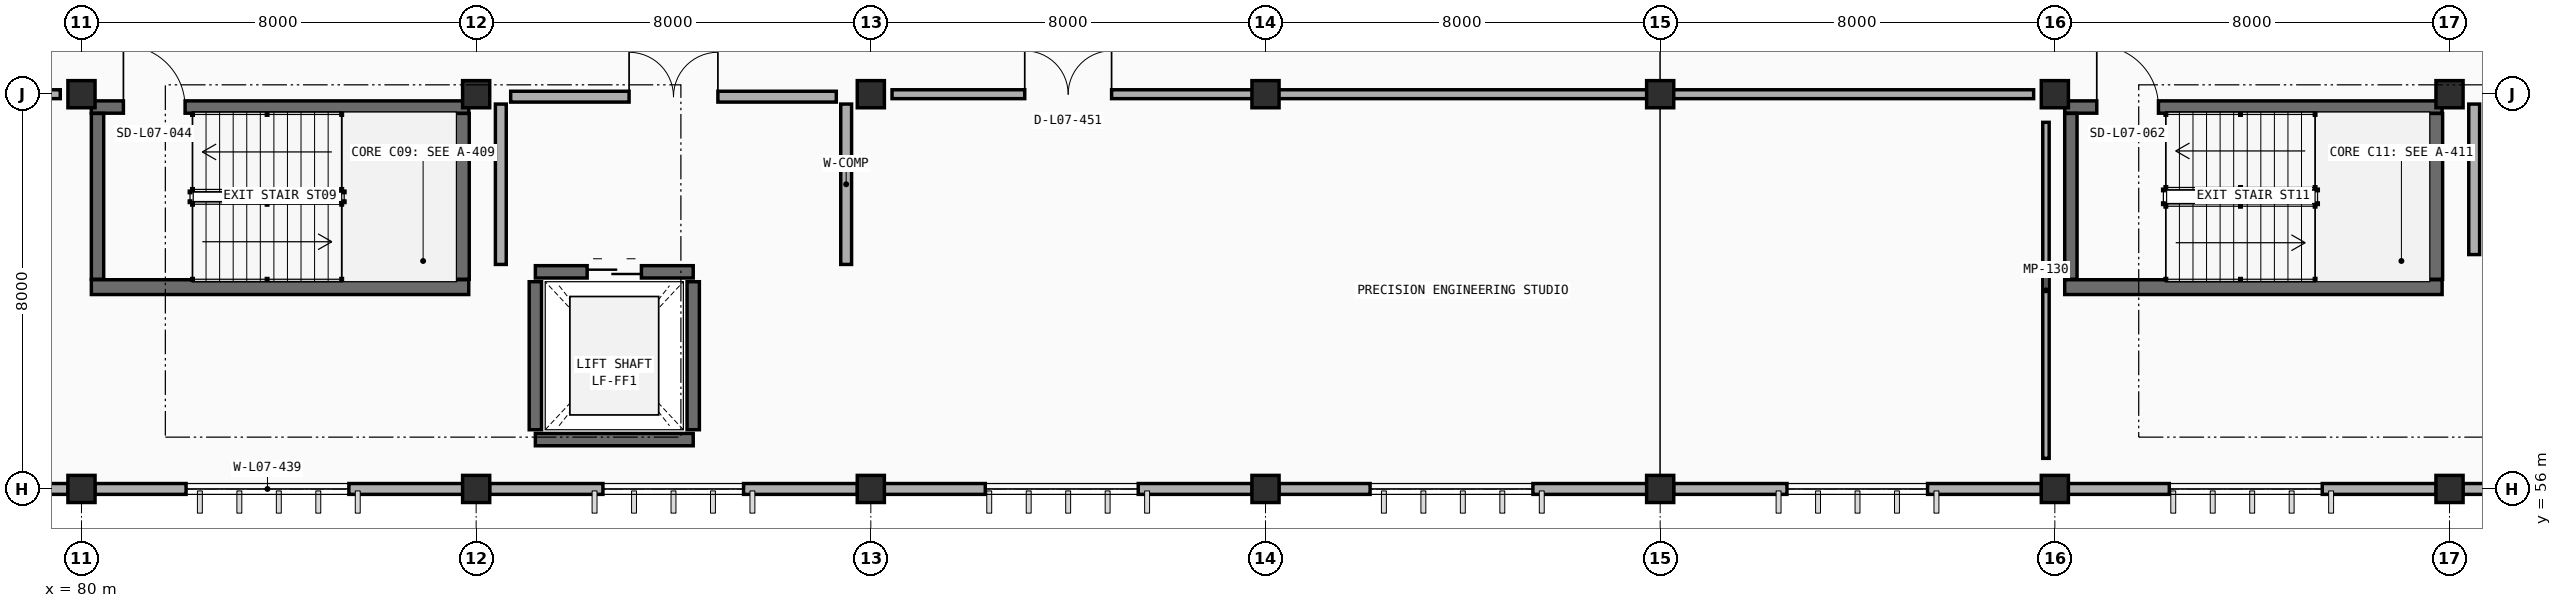
"""IFC4 building model, lengths in metres.
Left out: names, types, materials, properties, quantities, classifications, styles, units other than length and angle.
Written with IfcOpenShell. Run it as: python <this file> out.ifc"""

import sys

from ifc_helpers import new_model, si_unit, direction, frame, frame_2d, origin, origin_2d, place, context, subcontext, project, spatial, rectangle, extrude, element, fill, save


model = new_model("IFC4")
c1 = context("Model", 3, precision=1e-05, world=origin(), true_north=direction((0.0, 1.0)))
c2 = subcontext(c1, "Body", "Model", "MODEL_VIEW")
j1 = project(units=[si_unit("LENGTHUNIT", "METRE"), si_unit("PLANEANGLEUNIT", "RADIAN")], contexts=[c1])
p1 = place(None, origin())
s1 = spatial("IfcSite", under=j1, at=p1, CompositionType="ELEMENT")
p2 = place(p1, origin())
s2 = spatial("IfcBuilding", under=s1, at=p2, CompositionType="ELEMENT")
p3 = place(p2, frame((0.0, 0.0, 26.4)))
s3 = spatial("IfcBuildingStorey", under=s2, at=p3, CompositionType="ELEMENT", Elevation=26.4)
for number, where, z_axis, x_axis in (
    (1, (80.0, 56.0, 0.0), (0.0, 0.0, 1.0), (1.0, 0.0, 0.0)),
    (2, (88.0, 56.0, 0.0), (0.0, 0.0, 1.0), (1.0, 0.0, 0.0)),
    (3, (96.0, 56.0, 0.0), (0.0, 0.0, 1.0), (1.0, 0.0, 0.0)),
    (4, (104.0, 56.0, 0.0), (0.0, 0.0, 1.0), (1.0, 0.0, 0.0)),
    (5, (112.0, 56.0, 0.0), (0.0, 0.0, 1.0), (1.0, 0.0, 0.0)),
    (6, (120.0, 56.0, 0.0), (0.0, 0.0, 1.0), (1.0, 0.0, 0.0)),
    (7, (128.0, 56.0, 0.0), (0.0, 0.0, 1.0), (1.0, 0.0, 0.0)),
    (8, (80.0, 64.0, 0.0), (0.0, 0.0, 1.0), (1.0, 0.0, 0.0)),
    (9, (88.0, 64.0, 0.0), (0.0, 0.0, 1.0), (1.0, 0.0, 0.0)),
    (10, (96.0, 64.0, 0.0), (0.0, 0.0, 1.0), (1.0, 0.0, 0.0)),
    (11, (104.0, 64.0, 0.0), (0.0, 0.0, 1.0), (1.0, 0.0, 0.0)),
    (12, (112.0, 64.0, 0.0), (0.0, 0.0, 1.0), (1.0, 0.0, 0.0)),
    (13, (120.0, 64.0, 0.0), (0.0, 0.0, 1.0), (1.0, 0.0, 0.0)),
    (14, (128.0, 64.0, 0.0), (0.0, 0.0, 1.0), (1.0, 0.0, 0.0)),
):
    element("IfcColumn", number, at=place(p3, frame(where, z_axis=z_axis, x_axis=x_axis)), inside=s3, PredefinedType="COLUMN", context=c2, shape_type="SweptSolid", body=[
        extrude(rectangle(XDim=0.55, YDim=0.55, at=origin_2d()), origin(), (0.0, 0.0, 1.0), 4.2),
    ])
p4 = place(p3, frame((79.728, 56.0, 0.0), z_axis=(0.0, 0.0, 1.0), x_axis=(-1.0, 0.0, 0.0)))
e15 = element("IfcWall", 15, at=p4, inside=s3, PredefinedType="STANDARD", context=c2, shape_type="SweptSolid", body=[
    extrude(rectangle(XDim=7.456, YDim=0.22, at=frame_2d((3.728, 0.0))), origin(), (0.0, 0.0, 1.0), 3.35),
])
p5 = place(p4, frame((2.308, 0.0, 0.9)))
e16 = element("IfcOpeningElement", 16, at=p5, cuts=e15, PredefinedType="OPENING", context=c2, shape_type="SweptSolid", body=[
    extrude(rectangle(XDim=3.1, YDim=1.6, at=frame_2d((1.55, 0.8))), frame((0.0, 0.12, 0.0), z_axis=(0.0, -1.0, 0.0), x_axis=(1.0, 0.0, 0.0)), (0.0, 0.0, 1.0), 0.24),
])
p6 = place(p3, frame((87.728, 56.0, 0.0), z_axis=(0.0, 0.0, 1.0), x_axis=(-1.0, 0.0, 0.0)))
e17 = element("IfcWall", 17, at=p6, inside=s3, PredefinedType="STANDARD", context=c2, shape_type="SweptSolid", body=[
    extrude(rectangle(XDim=7.456, YDim=0.22, at=frame_2d((3.728, 0.0))), origin(), (0.0, 0.0, 1.0), 3.35),
])
p7 = place(p6, frame((2.308, 0.0, 0.9)))
e18 = element("IfcOpeningElement", 18, at=p7, cuts=e17, PredefinedType="OPENING", context=c2, shape_type="SweptSolid", body=[
    extrude(rectangle(XDim=3.3, YDim=1.75, at=frame_2d((1.65, 0.875))), frame((0.0, 0.12, 0.0), z_axis=(0.0, -1.0, 0.0), x_axis=(1.0, 0.0, 0.0)), (0.0, 0.0, 1.0), 0.24),
])
p8 = place(p3, frame((95.728, 56.0, 0.0), z_axis=(0.0, 0.0, 1.0), x_axis=(-1.0, 0.0, 0.0)))
e19 = element("IfcWall", 19, at=p8, inside=s3, PredefinedType="STANDARD", context=c2, shape_type="SweptSolid", body=[
    extrude(rectangle(XDim=7.456, YDim=0.22, at=frame_2d((3.728, 0.0))), origin(), (0.0, 0.0, 1.0), 3.35),
])
p9 = place(p8, frame((2.308, 0.0, 0.9)))
e20 = element("IfcOpeningElement", 20, at=p9, cuts=e19, PredefinedType="OPENING", context=c2, shape_type="SweptSolid", body=[
    extrude(rectangle(XDim=2.85, YDim=2.0, at=frame_2d((1.425, 1.0))), frame((0.0, 0.12, 0.0), z_axis=(0.0, -1.0, 0.0), x_axis=(1.0, 0.0, 0.0)), (0.0, 0.0, 1.0), 0.24),
])
p10 = place(p3, frame((103.728, 56.0, 0.0), z_axis=(0.0, 0.0, 1.0), x_axis=(-1.0, 0.0, 0.0)))
e21 = element("IfcWall", 21, at=p10, inside=s3, PredefinedType="STANDARD", context=c2, shape_type="SweptSolid", body=[
    extrude(rectangle(XDim=7.456, YDim=0.22, at=frame_2d((3.728, 0.0))), origin(), (0.0, 0.0, 1.0), 3.35),
])
p11 = place(p10, frame((2.308, 0.0, 0.9)))
e22 = element("IfcOpeningElement", 22, at=p11, cuts=e21, PredefinedType="OPENING", context=c2, shape_type="SweptSolid", body=[
    extrude(rectangle(XDim=3.1, YDim=1.6, at=frame_2d((1.55, 0.8))), frame((0.0, 0.12, 0.0), z_axis=(0.0, -1.0, 0.0), x_axis=(1.0, 0.0, 0.0)), (0.0, 0.0, 1.0), 0.24),
])
p12 = place(p3, frame((111.728, 56.0, 0.0), z_axis=(0.0, 0.0, 1.0), x_axis=(-1.0, 0.0, 0.0)))
e23 = element("IfcWall", 23, at=p12, inside=s3, PredefinedType="STANDARD", context=c2, shape_type="SweptSolid", body=[
    extrude(rectangle(XDim=7.456, YDim=0.22, at=frame_2d((3.728, 0.0))), origin(), (0.0, 0.0, 1.0), 3.35),
])
p13 = place(p12, frame((2.308, 0.0, 0.9)))
e24 = element("IfcOpeningElement", 24, at=p13, cuts=e23, PredefinedType="OPENING", context=c2, shape_type="SweptSolid", body=[
    extrude(rectangle(XDim=3.3, YDim=1.75, at=frame_2d((1.65, 0.875))), frame((0.0, 0.12, 0.0), z_axis=(0.0, -1.0, 0.0), x_axis=(1.0, 0.0, 0.0)), (0.0, 0.0, 1.0), 0.24),
])
p14 = place(p3, frame((119.728, 56.0, 0.0), z_axis=(0.0, 0.0, 1.0), x_axis=(-1.0, 0.0, 0.0)))
e25 = element("IfcWall", 25, at=p14, inside=s3, PredefinedType="STANDARD", context=c2, shape_type="SweptSolid", body=[
    extrude(rectangle(XDim=7.456, YDim=0.22, at=frame_2d((3.728, 0.0))), origin(), (0.0, 0.0, 1.0), 3.35),
])
p15 = place(p14, frame((2.308, 0.0, 0.9)))
e26 = element("IfcOpeningElement", 26, at=p15, cuts=e25, PredefinedType="OPENING", context=c2, shape_type="SweptSolid", body=[
    extrude(rectangle(XDim=2.85, YDim=2.0, at=frame_2d((1.425, 1.0))), frame((0.0, 0.12, 0.0), z_axis=(0.0, -1.0, 0.0), x_axis=(1.0, 0.0, 0.0)), (0.0, 0.0, 1.0), 0.24),
])
p16 = place(p3, frame((127.728, 56.0, 0.0), z_axis=(0.0, 0.0, 1.0), x_axis=(-1.0, 0.0, 0.0)))
e27 = element("IfcWall", 27, at=p16, inside=s3, PredefinedType="STANDARD", context=c2, shape_type="SweptSolid", body=[
    extrude(rectangle(XDim=7.456, YDim=0.22, at=frame_2d((3.728, 0.0))), origin(), (0.0, 0.0, 1.0), 3.35),
])
p17 = place(p16, frame((2.308, 0.0, 0.9)))
e28 = element("IfcOpeningElement", 28, at=p17, cuts=e27, PredefinedType="OPENING", context=c2, shape_type="SweptSolid", body=[
    extrude(rectangle(XDim=3.1, YDim=1.6, at=frame_2d((1.55, 0.8))), frame((0.0, 0.12, 0.0), z_axis=(0.0, -1.0, 0.0), x_axis=(1.0, 0.0, 0.0)), (0.0, 0.0, 1.0), 0.24),
])
p18 = place(p3, frame((135.728, 56.0, 0.0), z_axis=(0.0, 0.0, 1.0), x_axis=(-1.0, 0.0, 0.0)))
e29 = element("IfcWall", 29, at=p18, inside=s3, PredefinedType="STANDARD", context=c2, shape_type="SweptSolid", body=[
    extrude(rectangle(XDim=7.456, YDim=0.22, at=frame_2d((3.728, 0.0))), origin(), (0.0, 0.0, 1.0), 3.35),
])
p19 = place(p18, frame((2.308, 0.0, 0.9)))
e30 = element("IfcOpeningElement", 30, at=p19, cuts=e29, PredefinedType="OPENING", context=c2, shape_type="SweptSolid", body=[
    extrude(rectangle(XDim=3.3, YDim=1.75, at=frame_2d((1.65, 0.875))), frame((0.0, 0.12, 0.0), z_axis=(0.0, -1.0, 0.0), x_axis=(1.0, 0.0, 0.0)), (0.0, 0.0, 1.0), 0.24),
])
p20 = place(p3, frame((79.9, 48.22, 0.0), z_axis=(0.0, 0.0, 1.0), x_axis=(0.0, 1.0, 0.0)))
e31 = element("IfcWall", 31, at=p20, inside=s3, PredefinedType="PARAPET", context=c2, shape_type="SweptSolid", body=[
    extrude(rectangle(XDim=7.56, YDim=0.18, at=frame_2d((3.78, 0.0))), origin(), (0.0, 0.0, 1.0), 1.15),
])
p21 = place(p3, frame((80.2, 60.09, 0.0), z_axis=(0.0, 0.0, 1.0), x_axis=(1.0, 0.0, 0.0)))
e32 = element("IfcWall", 32, at=p21, inside=s3, PredefinedType="SHEAR", context=c2, shape_type="SweptSolid", body=[
    extrude(rectangle(XDim=7.65, YDim=0.3, at=frame_2d((3.825, 0.0))), origin(), (0.0, 0.0, 1.0), 4.2),
])
p22 = place(p3, frame((87.71, 60.25, 0.0), z_axis=(0.0, 0.0, 1.0), x_axis=(0.0, 1.0, 0.0)))
e33 = element("IfcWall", 33, at=p22, inside=s3, PredefinedType="SHEAR", context=c2, shape_type="SweptSolid", body=[
    extrude(rectangle(XDim=3.36, YDim=0.3, at=frame_2d((1.68, 0.0))), origin(), (0.0, 0.0, 1.0), 4.2),
])
p23 = place(p3, frame((80.2, 63.74, 0.0), z_axis=(0.0, 0.0, 1.0), x_axis=(1.0, 0.0, 0.0)))
e34 = element("IfcWall", 34, at=p23, inside=s3, PredefinedType="SOLIDWALL", context=c2, shape_type="SweptSolid", body=[
    extrude(rectangle(XDim=7.65, YDim=0.25, at=frame_2d((3.825, 0.0))), origin(), (0.0, 0.0, 1.0), 4.2),
])
p24 = place(p23, frame((0.65, 0.0, 0.0)))
e35 = element("IfcOpeningElement", 35, at=p24, cuts=e34, PredefinedType="OPENING", context=c2, shape_type="SweptSolid", body=[
    extrude(rectangle(XDim=1.25, YDim=2.15, at=frame_2d((0.625, 1.075))), frame((0.0, 0.135, 0.0), z_axis=(0.0, -1.0, 0.0), x_axis=(1.0, 0.0, 0.0)), (0.0, 0.0, 1.0), 0.27),
])
p25 = place(p3, frame((80.325, 60.25, 0.0), z_axis=(0.0, 0.0, 1.0), x_axis=(0.0, 1.0, 0.0)))
e36 = element("IfcWall", 36, at=p25, inside=s3, PredefinedType="SOLIDWALL", context=c2, shape_type="SweptSolid", body=[
    extrude(rectangle(XDim=3.36, YDim=0.25, at=frame_2d((1.68, 0.0))), origin(), (0.0, 0.0, 1.0), 4.2),
])
p26 = place(p3, frame((120.2, 60.09, 0.0), z_axis=(0.0, 0.0, 1.0), x_axis=(1.0, 0.0, 0.0)))
e37 = element("IfcWall", 37, at=p26, inside=s3, PredefinedType="SHEAR", context=c2, shape_type="SweptSolid", body=[
    extrude(rectangle(XDim=7.65, YDim=0.3, at=frame_2d((3.825, 0.0))), origin(), (0.0, 0.0, 1.0), 4.2),
])
p27 = place(p3, frame((127.71, 60.25, 0.0), z_axis=(0.0, 0.0, 1.0), x_axis=(0.0, 1.0, 0.0)))
e38 = element("IfcWall", 38, at=p27, inside=s3, PredefinedType="SHEAR", context=c2, shape_type="SweptSolid", body=[
    extrude(rectangle(XDim=3.36, YDim=0.3, at=frame_2d((1.68, 0.0))), origin(), (0.0, 0.0, 1.0), 4.2),
])
p28 = place(p3, frame((120.2, 63.74, 0.0), z_axis=(0.0, 0.0, 1.0), x_axis=(1.0, 0.0, 0.0)))
e39 = element("IfcWall", 39, at=p28, inside=s3, PredefinedType="SOLIDWALL", context=c2, shape_type="SweptSolid", body=[
    extrude(rectangle(XDim=7.65, YDim=0.25, at=frame_2d((3.825, 0.0))), origin(), (0.0, 0.0, 1.0), 4.2),
])
p29 = place(p28, frame((0.65, 0.0, 0.0)))
e40 = element("IfcOpeningElement", 40, at=p29, cuts=e39, PredefinedType="OPENING", context=c2, shape_type="SweptSolid", body=[
    extrude(rectangle(XDim=1.25, YDim=2.15, at=frame_2d((0.625, 1.075))), frame((0.0, 0.135, 0.0), z_axis=(0.0, -1.0, 0.0), x_axis=(1.0, 0.0, 0.0)), (0.0, 0.0, 1.0), 0.27),
])
p30 = place(p3, frame((120.325, 60.25, 0.0), z_axis=(0.0, 0.0, 1.0), x_axis=(0.0, 1.0, 0.0)))
e41 = element("IfcWall", 41, at=p30, inside=s3, PredefinedType="SOLIDWALL", context=c2, shape_type="SweptSolid", body=[
    extrude(rectangle(XDim=3.36, YDim=0.25, at=frame_2d((1.68, 0.0))), origin(), (0.0, 0.0, 1.0), 4.2),
])
p31 = place(p3, frame((89.2, 57.0, 0.0), z_axis=(0.0, 0.0, 1.0), x_axis=(1.0, 0.0, 0.0)))
e42 = element("IfcWall", 42, at=p31, inside=s3, PredefinedType="SOLIDWALL", context=c2, shape_type="SweptSolid", body=[
    extrude(rectangle(XDim=3.2, YDim=0.25, at=frame_2d((1.6, 0.0))), origin(), (0.0, 0.0, 1.0), 4.2),
])
p32 = place(p3, frame((89.2, 60.4, 0.0), z_axis=(0.0, 0.0, 1.0), x_axis=(1.0, 0.0, 0.0)))
e43 = element("IfcWall", 43, at=p32, inside=s3, PredefinedType="SOLIDWALL", context=c2, shape_type="SweptSolid", body=[
    extrude(rectangle(XDim=3.2, YDim=0.25, at=frame_2d((1.6, 0.0))), origin(), (0.0, 0.0, 1.0), 4.2),
])
p33 = place(p32, frame((1.05, 0.0, 0.0)))
e44 = element("IfcOpeningElement", 44, at=p33, cuts=e43, PredefinedType="OPENING", context=c2, shape_type="SweptSolid", body=[
    extrude(rectangle(XDim=1.1, YDim=2.15, at=frame_2d((0.55, 1.075))), frame((0.0, 0.135, 0.0), z_axis=(0.0, -1.0, 0.0), x_axis=(1.0, 0.0, 0.0)), (0.0, 0.0, 1.0), 0.27),
])
for number, where, z_axis, x_axis in (
    (45, (89.2, 57.2, 0.0), (0.0, 0.0, 1.0), (0.0, 1.0, 0.0)),
    (46, (92.4, 57.2, 0.0), (0.0, 0.0, 1.0), (0.0, 1.0, 0.0)),
):
    element("IfcWall", number, at=place(p3, frame(where, z_axis=z_axis, x_axis=x_axis)), inside=s3, PredefinedType="SOLIDWALL", context=c2, shape_type="SweptSolid", body=[
        extrude(rectangle(XDim=3.0, YDim=0.25, at=frame_2d((1.5, 0.0))), origin(), (0.0, 0.0, 1.0), 4.2),
    ])
p34 = place(p3, frame((88.7, 63.95, 0.0), z_axis=(0.0, 0.0, 1.0), x_axis=(1.0, 0.0, 0.0)))
e47 = element("IfcWall", 47, at=p34, inside=s3, PredefinedType="PARTITIONING", context=c2, shape_type="SweptSolid", body=[
    extrude(rectangle(XDim=6.6, YDim=0.22, at=frame_2d((3.3, 0.0))), origin(), (0.0, 0.0, 1.0), 3.3),
])
p35 = place(p34, frame((2.4, 0.0, 0.0)))
e48 = element("IfcOpeningElement", 48, at=p35, cuts=e47, PredefinedType="OPENING", context=c2, shape_type="SweptSolid", body=[
    extrude(rectangle(XDim=1.8, YDim=2.2, at=frame_2d((0.9, 1.1))), frame((0.0, 0.12, 0.0), z_axis=(0.0, -1.0, 0.0), x_axis=(1.0, 0.0, 0.0)), (0.0, 0.0, 1.0), 0.24),
])
for number, where, z_axis, x_axis in (
    (49, (88.5, 60.55, 0.0), (0.0, 0.0, 1.0), (0.0, 1.0, 0.0)),
    (50, (95.5, 60.55, 0.0), (0.0, 0.0, 1.0), (0.0, 1.0, 0.0)),
):
    element("IfcWall", number, at=place(p3, frame(where, z_axis=z_axis, x_axis=x_axis)), inside=s3, PredefinedType="PARTITIONING", context=c2, shape_type="SweptSolid", body=[
        extrude(rectangle(XDim=3.25, YDim=0.22, at=frame_2d((1.625, 0.0))), origin(), (0.0, 0.0, 1.0), 3.3),
    ])
p36 = place(p3, frame((128.5, 60.75, 0.0), z_axis=(0.0, 0.0, 1.0), x_axis=(0.0, 1.0, 0.0)))
e51 = element("IfcWall", 51, at=p36, inside=s3, PredefinedType="PARTITIONING", context=c2, shape_type="SweptSolid", body=[
    extrude(rectangle(XDim=3.05, YDim=0.22, at=frame_2d((1.525, 0.0))), origin(), (0.0, 0.0, 1.0), 3.3),
])
p37 = place(p3, frame((64.43, 64.0, 0.0), z_axis=(0.0, 0.0, 1.0), x_axis=(1.0, 0.0, 0.0)))
e52 = element("IfcWall", 52, at=p37, inside=s3, PredefinedType="PARTITIONING", context=c2, shape_type="SweptSolid", body=[
    extrude(rectangle(XDim=15.14, YDim=0.18, at=frame_2d((7.57, 0.0))), origin(), (0.0, 0.0, 1.0), 3.3),
])
p38 = place(p37, frame((2.92, 0.0, 0.0)))
e53 = element("IfcOpeningElement", 53, at=p38, cuts=e52, PredefinedType="OPENING", context=c2, shape_type="SweptSolid", body=[
    extrude(rectangle(XDim=1.3, YDim=2.18, at=frame_2d((0.65, 1.09))), frame((0.0, 0.1, 0.0), z_axis=(0.0, -1.0, 0.0), x_axis=(1.0, 0.0, 0.0)), (0.0, 0.0, 1.0), 0.2),
])
p39 = place(p3, frame((96.43, 64.0, 0.0), z_axis=(0.0, 0.0, 1.0), x_axis=(1.0, 0.0, 0.0)))
e54 = element("IfcWall", 54, at=p39, inside=s3, PredefinedType="PARTITIONING", context=c2, shape_type="SweptSolid", body=[
    extrude(rectangle(XDim=23.14, YDim=0.18, at=frame_2d((11.57, 0.0))), origin(), (0.0, 0.0, 1.0), 3.3),
])
p40 = place(p39, frame((2.69, 0.0, 0.0)))
e55 = element("IfcOpeningElement", 55, at=p40, cuts=e54, PredefinedType="OPENING", context=c2, shape_type="SweptSolid", body=[
    extrude(rectangle(XDim=1.76, YDim=2.25, at=frame_2d((0.88, 1.125))), frame((0.0, 0.1, 0.0), z_axis=(0.0, -1.0, 0.0), x_axis=(1.0, 0.0, 0.0)), (0.0, 0.0, 1.0), 0.2),
])
p41 = place(p3, frame((119.82, 56.62, 0.0), z_axis=(0.0, 0.0, 1.0), x_axis=(0.0, 1.0, 0.0)))
e56 = element("IfcWall", 56, at=p41, inside=s3, PredefinedType="MOVABLE", context=c2, shape_type="SweptSolid", body=[
    extrude(rectangle(XDim=6.81, YDim=0.13, at=frame_2d((3.405, 0.0))), origin(), (0.0, 0.0, 1.0), 3.3),
])
p42 = place(p7, origin())
e57 = element("IfcWindow", 57, at=p42, inside=s3, PartitioningType="DOUBLE_PANEL_VERTICAL", PredefinedType="WINDOW", context=c2, shape_type="SweptSolid", body=[
    extrude(rectangle(XDim=3.3, YDim=1.75, at=frame_2d((1.65, 0.875))), frame((0.0, 0.03, 0.0), z_axis=(0.0, -1.0, 0.0), x_axis=(1.0, 0.0, 0.0)), (0.0, 0.0, 1.0), 0.06),
])
fill(e18, e57)
p43 = place(p9, origin())
e58 = element("IfcWindow", 58, at=p43, inside=s3, PartitioningType="DOUBLE_PANEL_VERTICAL", PredefinedType="WINDOW", context=c2, shape_type="SweptSolid", body=[
    extrude(rectangle(XDim=2.85, YDim=2.0, at=frame_2d((1.425, 1.0))), frame((0.0, 0.03, 0.0), z_axis=(0.0, -1.0, 0.0), x_axis=(1.0, 0.0, 0.0)), (0.0, 0.0, 1.0), 0.06),
])
fill(e20, e58)
p44 = place(p11, origin())
e59 = element("IfcWindow", 59, at=p44, inside=s3, PartitioningType="DOUBLE_PANEL_VERTICAL", PredefinedType="WINDOW", context=c2, shape_type="SweptSolid", body=[
    extrude(rectangle(XDim=3.1, YDim=1.6, at=frame_2d((1.55, 0.8))), frame((0.0, 0.03, 0.0), z_axis=(0.0, -1.0, 0.0), x_axis=(1.0, 0.0, 0.0)), (0.0, 0.0, 1.0), 0.06),
])
fill(e22, e59)
p45 = place(p13, origin())
e60 = element("IfcWindow", 60, at=p45, inside=s3, PartitioningType="DOUBLE_PANEL_VERTICAL", PredefinedType="WINDOW", context=c2, shape_type="SweptSolid", body=[
    extrude(rectangle(XDim=3.3, YDim=1.75, at=frame_2d((1.65, 0.875))), frame((0.0, 0.03, 0.0), z_axis=(0.0, -1.0, 0.0), x_axis=(1.0, 0.0, 0.0)), (0.0, 0.0, 1.0), 0.06),
])
fill(e24, e60)
p46 = place(p15, origin())
e61 = element("IfcWindow", 61, at=p46, inside=s3, PartitioningType="DOUBLE_PANEL_VERTICAL", PredefinedType="WINDOW", context=c2, shape_type="SweptSolid", body=[
    extrude(rectangle(XDim=2.85, YDim=2.0, at=frame_2d((1.425, 1.0))), frame((0.0, 0.03, 0.0), z_axis=(0.0, -1.0, 0.0), x_axis=(1.0, 0.0, 0.0)), (0.0, 0.0, 1.0), 0.06),
])
fill(e26, e61)
p47 = place(p17, origin())
e62 = element("IfcWindow", 62, at=p47, inside=s3, PartitioningType="DOUBLE_PANEL_VERTICAL", PredefinedType="WINDOW", context=c2, shape_type="SweptSolid", body=[
    extrude(rectangle(XDim=3.1, YDim=1.6, at=frame_2d((1.55, 0.8))), frame((0.0, 0.03, 0.0), z_axis=(0.0, -1.0, 0.0), x_axis=(1.0, 0.0, 0.0)), (0.0, 0.0, 1.0), 0.06),
])
fill(e28, e62)
p48 = place(p24, origin())
e63 = element("IfcDoor", 63, at=p48, inside=s3, OperationType="SINGLE_SWING_LEFT", PredefinedType="DOOR", context=c2, shape_type="SweptSolid", body=[
    extrude(rectangle(XDim=1.25, YDim=2.15, at=frame_2d((0.625, 1.075))), frame((0.0, 0.025, 0.0), z_axis=(0.0, -1.0, 0.0), x_axis=(1.0, 0.0, 0.0)), (0.0, 0.0, 1.0), 0.05),
])
fill(e35, e63)
p49 = place(p29, origin())
e64 = element("IfcDoor", 64, at=p49, inside=s3, OperationType="SINGLE_SWING_LEFT", PredefinedType="DOOR", context=c2, shape_type="SweptSolid", body=[
    extrude(rectangle(XDim=1.25, YDim=2.15, at=frame_2d((0.625, 1.075))), frame((0.0, 0.025, 0.0), z_axis=(0.0, -1.0, 0.0), x_axis=(1.0, 0.0, 0.0)), (0.0, 0.0, 1.0), 0.05),
])
fill(e40, e64)
p50 = place(p33, origin())
e65 = element("IfcDoor", 65, at=p50, inside=s3, OperationType="DOUBLE_DOOR_SLIDING", PredefinedType="DOOR", context=c2, shape_type="SweptSolid", body=[
    extrude(rectangle(XDim=1.1, YDim=2.15, at=frame_2d((0.55, 1.075))), frame((0.0, 0.025, 0.0), z_axis=(0.0, -1.0, 0.0), x_axis=(1.0, 0.0, 0.0)), (0.0, 0.0, 1.0), 0.05),
])
fill(e44, e65)
p51 = place(p35, origin())
e66 = element("IfcDoor", 66, at=p51, inside=s3, OperationType="DOUBLE_DOOR_SINGLE_SWING", PredefinedType="DOOR", context=c2, shape_type="SweptSolid", body=[
    extrude(rectangle(XDim=1.8, YDim=2.2, at=frame_2d((0.9, 1.1))), frame((0.0, 0.025, 0.0), z_axis=(0.0, -1.0, 0.0), x_axis=(1.0, 0.0, 0.0)), (0.0, 0.0, 1.0), 0.05),
])
fill(e48, e66)
p52 = place(p40, origin())
e67 = element("IfcDoor", 67, at=p52, inside=s3, OperationType="DOUBLE_DOOR_SINGLE_SWING", PredefinedType="DOOR", context=c2, shape_type="SweptSolid", body=[
    extrude(rectangle(XDim=1.76, YDim=2.25, at=frame_2d((0.88, 1.125))), frame((0.0, 0.025, 0.0), z_axis=(0.0, -1.0, 0.0), x_axis=(1.0, 0.0, 0.0)), (0.0, 0.0, 1.0), 0.05),
])
fill(e55, e67)
save(model, sys.argv[1])
